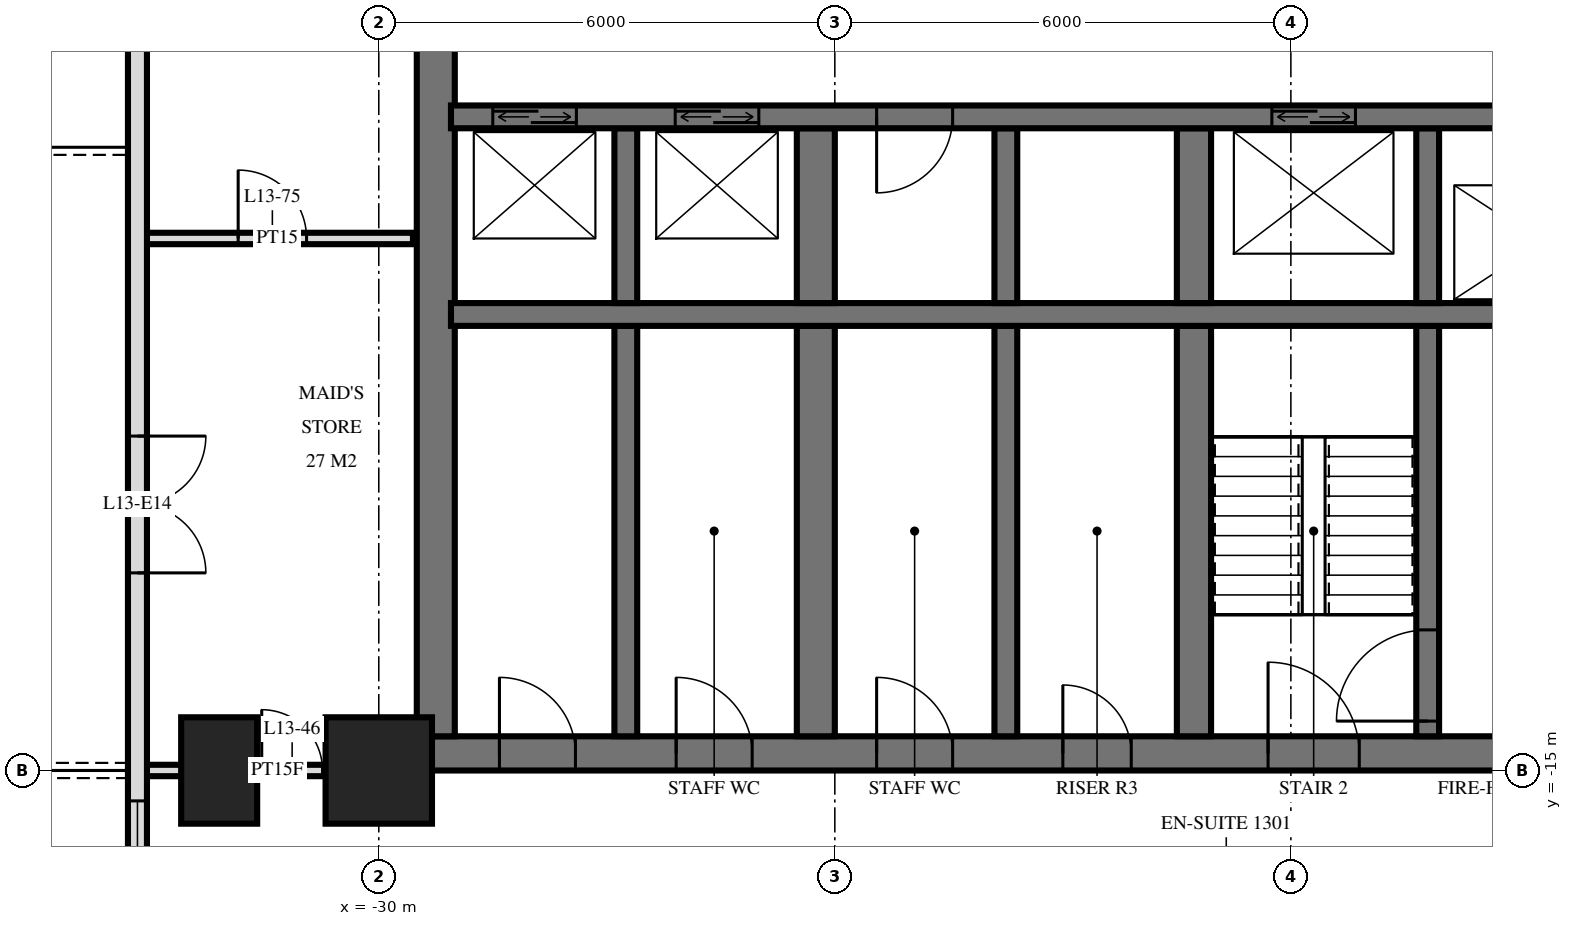
"""IFC4 building model, lengths in metres.
Left out: names, types, materials, properties, quantities, classifications, styles, units other than length and angle.
Written with IfcOpenShell. Run it as: python <this file> out.ifc"""

import sys

from ifc_helpers import new_model, si_unit, direction, frame, frame_2d, origin, origin_2d, place, context, subcontext, project, spatial, rectangle, extrude, element, fill, save


model = new_model("IFC4")
c1 = context("Model", 3, precision=1e-05, world=origin(), true_north=direction((0.0, 1.0)))
c2 = subcontext(c1, "Body", "Model", "MODEL_VIEW")
j1 = project(units=[si_unit("LENGTHUNIT", "METRE"), si_unit("PLANEANGLEUNIT", "RADIAN")], contexts=[c1])
p1 = place(None, origin())
s1 = spatial("IfcSite", under=j1, at=p1, CompositionType="ELEMENT")
p2 = place(p1, origin())
s2 = spatial("IfcBuilding", under=s1, at=p2, CompositionType="ELEMENT")
p3 = place(p2, frame((0.0, 0.0, 56.4)))
s3 = spatial("IfcBuildingStorey", under=s2, at=p3, CompositionType="ELEMENT", Elevation=56.4)
p4 = place(p3, frame((-32.1, -15.0, 0.0), z_axis=(0.0, 0.0, 1.0), x_axis=(0.0, 1.0, 0.0)))
e1 = element("IfcColumn", 1, at=p4, inside=s3, PredefinedType="COLUMN", context=c2, shape_type="SweptSolid", body=[
    extrude(rectangle(XDim=1.4, YDim=1.0, at=origin_2d()), origin(), (0.0, 0.0, 1.0), 3.6),
])
p5 = place(p3, frame((-30.0, -15.0, 0.0), z_axis=(0.0, 0.0, 1.0), x_axis=(1.0, 0.0, 0.0)))
e2 = element("IfcColumn", 2, at=p5, inside=s3, PredefinedType="COLUMN", context=c2, shape_type="SweptSolid", body=[
    extrude(rectangle(XDim=1.4, YDim=1.4, at=origin_2d()), origin(), (0.0, 0.0, 1.0), 3.6),
])
p6 = place(p3, frame((-29.5, -14.775, 0.0), z_axis=(0.0, 0.0, 1.0), x_axis=(1.0, 0.0, 0.0)))
e3 = element("IfcWall", 3, at=p6, inside=s3, PredefinedType="SHEAR", context=c2, shape_type="SweptSolid", body=[
    extrude(rectangle(XDim=19.5, YDim=0.45, at=frame_2d((9.75, 0.0))), origin(), (0.0, 0.0, 1.0), 3.6),
])
p7 = place(p6, frame((11.2, 0.0, 0.0)))
e4 = element("IfcOpeningElement", 4, at=p7, cuts=e3, PredefinedType="OPENING", context=c2, shape_type="SweptSolid", body=[
    extrude(rectangle(XDim=1.2, YDim=2.1, at=frame_2d((0.6, 1.05))), frame((0.0, 0.235, 0.0), z_axis=(0.0, -1.0, 0.0), x_axis=(1.0, 0.0, 0.0)), (0.0, 0.0, 1.0), 0.47),
])
p8 = place(p6, frame((14.25, 0.0, 0.0)))
e5 = element("IfcOpeningElement", 5, at=p8, cuts=e3, PredefinedType="OPENING", context=c2, shape_type="SweptSolid", body=[
    extrude(rectangle(XDim=1.1, YDim=2.1, at=frame_2d((0.55, 1.05))), frame((0.0, 0.235, 0.0), z_axis=(0.0, -1.0, 0.0), x_axis=(1.0, 0.0, 0.0)), (0.0, 0.0, 1.0), 0.47),
])
p9 = place(p6, frame((8.5, 0.0, 0.0)))
e6 = element("IfcOpeningElement", 6, at=p9, cuts=e3, PredefinedType="OPENING", context=c2, shape_type="SweptSolid", body=[
    extrude(rectangle(XDim=0.9, YDim=2.1, at=frame_2d((0.45, 1.05))), frame((0.0, 0.235, 0.0), z_axis=(0.0, -1.0, 0.0), x_axis=(1.0, 0.0, 0.0)), (0.0, 0.0, 1.0), 0.47),
])
p10 = place(p6, frame((6.05, 0.0, 0.0)))
e7 = element("IfcOpeningElement", 7, at=p10, cuts=e3, PredefinedType="OPENING", context=c2, shape_type="SweptSolid", body=[
    extrude(rectangle(XDim=1.0, YDim=2.1, at=frame_2d((0.5, 1.05))), frame((0.0, 0.235, 0.0), z_axis=(0.0, -1.0, 0.0), x_axis=(1.0, 0.0, 0.0)), (0.0, 0.0, 1.0), 0.47),
])
p11 = place(p6, frame((3.413, 0.0, 0.0)))
e8 = element("IfcOpeningElement", 8, at=p11, cuts=e3, PredefinedType="OPENING", context=c2, shape_type="SweptSolid", body=[
    extrude(rectangle(XDim=1.0, YDim=2.1, at=frame_2d((0.5, 1.05))), frame((0.0, 0.235, 0.0), z_axis=(0.0, -1.0, 0.0), x_axis=(1.0, 0.0, 0.0)), (0.0, 0.0, 1.0), 0.47),
])
p12 = place(p6, frame((1.087, 0.0, 0.0)))
e9 = element("IfcOpeningElement", 9, at=p12, cuts=e3, PredefinedType="OPENING", context=c2, shape_type="SweptSolid", body=[
    extrude(rectangle(XDim=1.0, YDim=2.1, at=frame_2d((0.5, 1.05))), frame((0.0, 0.235, 0.0), z_axis=(0.0, -1.0, 0.0), x_axis=(1.0, 0.0, 0.0)), (0.0, 0.0, 1.0), 0.47),
])
p13 = place(p3, frame((-29.25, -14.55, 0.0), z_axis=(0.0, 0.0, 1.0), x_axis=(0.0, 1.0, 0.0)))
e10 = element("IfcWall", 10, at=p13, inside=s3, PredefinedType="SHEAR", context=c2, shape_type="SweptSolid", body=[
    extrude(rectangle(XDim=14.1, YDim=0.5, at=frame_2d((7.05, 0.0))), origin(), (0.0, 0.0, 1.0), 3.6),
])
p14 = place(p3, frame((-29.05, -6.4, 0.0), z_axis=(0.0, 0.0, 1.0), x_axis=(1.0, 0.0, 0.0)))
e11 = element("IfcWall", 11, at=p14, inside=s3, PredefinedType="SHEAR", context=c2, shape_type="SweptSolid", body=[
    extrude(rectangle(XDim=18.7, YDim=0.3, at=frame_2d((9.35, 0.0))), origin(), (0.0, 0.0, 1.0), 3.6),
])
p15 = place(p14, frame((2.95, 0.0, 0.0)))
e12 = element("IfcOpeningElement", 12, at=p15, cuts=e11, PredefinedType="OPENING", context=c2, shape_type="SweptSolid", body=[
    extrude(rectangle(XDim=1.1, YDim=2.1, at=frame_2d((0.55, 1.05))), frame((0.0, 0.16, 0.0), z_axis=(0.0, -1.0, 0.0), x_axis=(1.0, 0.0, 0.0)), (0.0, 0.0, 1.0), 0.32),
])
p16 = place(p14, frame((0.55, 0.0, 0.0)))
e13 = element("IfcOpeningElement", 13, at=p16, cuts=e11, PredefinedType="OPENING", context=c2, shape_type="SweptSolid", body=[
    extrude(rectangle(XDim=1.1, YDim=2.1, at=frame_2d((0.55, 1.05))), frame((0.0, 0.16, 0.0), z_axis=(0.0, -1.0, 0.0), x_axis=(1.0, 0.0, 0.0)), (0.0, 0.0, 1.0), 0.32),
])
p17 = place(p14, frame((10.8, 0.0, 0.0)))
e14 = element("IfcOpeningElement", 14, at=p17, cuts=e11, PredefinedType="OPENING", context=c2, shape_type="SweptSolid", body=[
    extrude(rectangle(XDim=1.1, YDim=2.1, at=frame_2d((0.55, 1.05))), frame((0.0, 0.16, 0.0), z_axis=(0.0, -1.0, 0.0), x_axis=(1.0, 0.0, 0.0)), (0.0, 0.0, 1.0), 0.32),
])
p18 = place(p14, frame((5.6, 0.0, 0.0)))
e15 = element("IfcOpeningElement", 15, at=p18, cuts=e11, PredefinedType="OPENING", context=c2, shape_type="SweptSolid", body=[
    extrude(rectangle(XDim=1.0, YDim=2.1, at=frame_2d((0.5, 1.05))), frame((0.0, 0.16, 0.0), z_axis=(0.0, -1.0, 0.0), x_axis=(1.0, 0.0, 0.0)), (0.0, 0.0, 1.0), 0.32),
])
p19 = place(p3, frame((-29.05, -9.0, 0.0), z_axis=(0.0, 0.0, 1.0), x_axis=(1.0, 0.0, 0.0)))
e16 = element("IfcWall", 16, at=p19, inside=s3, PredefinedType="SHEAR", context=c2, shape_type="SweptSolid", body=[
    extrude(rectangle(XDim=18.7, YDim=0.3, at=frame_2d((9.35, 0.0))), origin(), (0.0, 0.0, 1.0), 3.6),
])
p20 = place(p19, frame((13.8, 0.0, 0.0)))
e17 = element("IfcOpeningElement", 17, at=p20, cuts=e16, PredefinedType="OPENING", context=c2, shape_type="SweptSolid", body=[
    extrude(rectangle(XDim=1.1, YDim=2.1, at=frame_2d((0.55, 1.05))), frame((0.0, 0.16, 0.0), z_axis=(0.0, -1.0, 0.0), x_axis=(1.0, 0.0, 0.0)), (0.0, 0.0, 1.0), 0.32),
])
p21 = place(p3, frame((-16.2, -8.85, 0.0), z_axis=(0.0, 0.0, 1.0), x_axis=(0.0, 1.0, 0.0)))
e18 = element("IfcWall", 18, at=p21, inside=s3, PredefinedType="SHEAR", context=c2, shape_type="SweptSolid", body=[
    extrude(rectangle(XDim=2.3, YDim=0.3, at=frame_2d((1.15, 0.0))), origin(), (0.0, 0.0, 1.0), 3.6),
])
p22 = place(p3, frame((-16.2, -14.55, 0.0), z_axis=(0.0, 0.0, 1.0), x_axis=(0.0, 1.0, 0.0)))
e19 = element("IfcWall", 19, at=p22, inside=s3, PredefinedType="SHEAR", context=c2, shape_type="SweptSolid", body=[
    extrude(rectangle(XDim=5.4, YDim=0.3, at=frame_2d((2.7, 0.0))), origin(), (0.0, 0.0, 1.0), 3.6),
])
p23 = place(p22, frame((0.2, 0.0, 0.0)))
e20 = element("IfcOpeningElement", 20, at=p23, cuts=e19, PredefinedType="OPENING", context=c2, shape_type="SweptSolid", body=[
    extrude(rectangle(XDim=1.2, YDim=2.1, at=frame_2d((0.6, 1.05))), frame((0.0, 0.16, 0.0), z_axis=(0.0, -1.0, 0.0), x_axis=(1.0, 0.0, 0.0)), (0.0, 0.0, 1.0), 0.32),
])
p24 = place(p3, frame((-19.275, -8.85, 0.0), z_axis=(0.0, 0.0, 1.0), x_axis=(0.0, 1.0, 0.0)))
e21 = element("IfcWall", 21, at=p24, inside=s3, PredefinedType="SHEAR", context=c2, shape_type="SweptSolid", body=[
    extrude(rectangle(XDim=2.3, YDim=0.45, at=frame_2d((1.15, 0.0))), origin(), (0.0, 0.0, 1.0), 3.6),
])
p25 = place(p3, frame((-19.275, -14.55, 0.0), z_axis=(0.0, 0.0, 1.0), x_axis=(0.0, 1.0, 0.0)))
e22 = element("IfcWall", 22, at=p25, inside=s3, PredefinedType="SHEAR", context=c2, shape_type="SweptSolid", body=[
    extrude(rectangle(XDim=5.4, YDim=0.45, at=frame_2d((2.7, 0.0))), origin(), (0.0, 0.0, 1.0), 3.6),
])
p26 = place(p3, frame((-21.75, -8.85, 0.0), z_axis=(0.0, 0.0, 1.0), x_axis=(0.0, 1.0, 0.0)))
e23 = element("IfcWall", 23, at=p26, inside=s3, PredefinedType="SHEAR", context=c2, shape_type="SweptSolid", body=[
    extrude(rectangle(XDim=2.3, YDim=0.3, at=frame_2d((1.15, 0.0))), origin(), (0.0, 0.0, 1.0), 3.6),
])
p27 = place(p3, frame((-21.75, -14.55, 0.0), z_axis=(0.0, 0.0, 1.0), x_axis=(0.0, 1.0, 0.0)))
e24 = element("IfcWall", 24, at=p27, inside=s3, PredefinedType="SHEAR", context=c2, shape_type="SweptSolid", body=[
    extrude(rectangle(XDim=5.4, YDim=0.3, at=frame_2d((2.7, 0.0))), origin(), (0.0, 0.0, 1.0), 3.6),
])
p28 = place(p3, frame((-24.25, -8.85, 0.0), z_axis=(0.0, 0.0, 1.0), x_axis=(0.0, 1.0, 0.0)))
e25 = element("IfcWall", 25, at=p28, inside=s3, PredefinedType="SHEAR", context=c2, shape_type="SweptSolid", body=[
    extrude(rectangle(XDim=2.3, YDim=0.5, at=frame_2d((1.15, 0.0))), origin(), (0.0, 0.0, 1.0), 3.6),
])
p29 = place(p3, frame((-24.25, -14.55, 0.0), z_axis=(0.0, 0.0, 1.0), x_axis=(0.0, 1.0, 0.0)))
e26 = element("IfcWall", 26, at=p29, inside=s3, PredefinedType="SHEAR", context=c2, shape_type="SweptSolid", body=[
    extrude(rectangle(XDim=5.4, YDim=0.5, at=frame_2d((2.7, 0.0))), origin(), (0.0, 0.0, 1.0), 3.6),
])
p30 = place(p3, frame((-26.75, -8.85, 0.0), z_axis=(0.0, 0.0, 1.0), x_axis=(0.0, 1.0, 0.0)))
e27 = element("IfcWall", 27, at=p30, inside=s3, PredefinedType="SHEAR", context=c2, shape_type="SweptSolid", body=[
    extrude(rectangle(XDim=2.3, YDim=0.3, at=frame_2d((1.15, 0.0))), origin(), (0.0, 0.0, 1.0), 3.6),
])
p31 = place(p3, frame((-26.75, -14.55, 0.0), z_axis=(0.0, 0.0, 1.0), x_axis=(0.0, 1.0, 0.0)))
e28 = element("IfcWall", 28, at=p31, inside=s3, PredefinedType="SHEAR", context=c2, shape_type="SweptSolid", body=[
    extrude(rectangle(XDim=5.4, YDim=0.3, at=frame_2d((2.7, 0.0))), origin(), (0.0, 0.0, 1.0), 3.6),
])
p32 = place(p3, frame((-33.175, -3.325, 0.0), z_axis=(0.0, 0.0, 1.0), x_axis=(0.0, -1.0, 0.0)))
e29 = element("IfcWall", 29, at=p32, inside=s3, PredefinedType="SOLIDWALL", context=c2, shape_type="SweptSolid", body=[
    extrude(rectangle(XDim=21.551, YDim=0.25, at=frame_2d((10.775, 0.0))), origin(), (0.0, 0.0, 1.0), 3.32),
])
p33 = place(p32, frame((7.275, 0.0, 0.0)))
e30 = element("IfcOpeningElement", 30, at=p33, cuts=e29, PredefinedType="OPENING", context=c2, shape_type="SweptSolid", body=[
    extrude(rectangle(XDim=1.8, YDim=2.4, at=frame_2d((0.9, 1.2))), frame((0.0, 0.135, 0.0), z_axis=(0.0, -1.0, 0.0), x_axis=(1.0, 0.0, 0.0)), (0.0, 0.0, 1.0), 0.27),
])
p34 = place(p32, frame((12.075, 0.0, 0.3)))
e31 = element("IfcOpeningElement", 31, at=p34, cuts=e29, PredefinedType="OPENING", context=c2, shape_type="SweptSolid", body=[
    extrude(rectangle(XDim=1.2, YDim=2.1, at=frame_2d((0.6, 1.05))), frame((0.0, 0.135, 0.0), z_axis=(0.0, -1.0, 0.0), x_axis=(1.0, 0.0, 0.0)), (0.0, 0.0, 1.0), 0.27),
])
p35 = place(p32, frame((14.875, 0.0, 0.0)))
e32 = element("IfcOpeningElement", 32, at=p35, cuts=e29, PredefinedType="OPENING", context=c2, shape_type="SweptSolid", body=[
    extrude(rectangle(XDim=1.8, YDim=2.4, at=frame_2d((0.9, 1.2))), frame((0.0, 0.135, 0.0), z_axis=(0.0, -1.0, 0.0), x_axis=(1.0, 0.0, 0.0)), (0.0, 0.0, 1.0), 0.27),
])
p36 = place(p32, frame((18.875, 0.0, 0.0)))
e33 = element("IfcOpeningElement", 33, at=p36, cuts=e29, PredefinedType="OPENING", context=c2, shape_type="SweptSolid", body=[
    extrude(rectangle(XDim=1.8, YDim=2.4, at=frame_2d((0.9, 1.2))), frame((0.0, 0.135, 0.0), z_axis=(0.0, -1.0, 0.0), x_axis=(1.0, 0.0, 0.0)), (0.0, 0.0, 1.0), 0.27),
])
p37 = place(p3, frame((-33.12, -15.0, 0.0), z_axis=(0.0, 0.0, 1.0), x_axis=(1.0, 0.0, 0.0)))
e34 = element("IfcWall", 34, at=p37, inside=s3, PredefinedType="PARTITIONING", context=c2, shape_type="SweptSolid", body=[
    extrude(rectangle(XDim=3.57, YDim=0.15, at=frame_2d((1.785, 0.0))), origin(), (0.0, 0.0, 1.0), 3.32),
])
p38 = place(p37, frame((1.58, 0.0, 0.0)))
e35 = element("IfcOpeningElement", 35, at=p38, cuts=e34, PredefinedType="OPENING", context=c2, shape_type="SweptSolid", body=[
    extrude(rectangle(XDim=0.8, YDim=2.1, at=frame_2d((0.4, 1.05))), frame((0.0, 0.085, 0.0), z_axis=(0.0, -1.0, 0.0), x_axis=(1.0, 0.0, 0.0)), (0.0, 0.0, 1.0), 0.17),
])
p39 = place(p3, frame((-33.12, -8.0, 0.0), z_axis=(0.0, 0.0, 1.0), x_axis=(1.0, 0.0, 0.0)))
e36 = element("IfcWall", 36, at=p39, inside=s3, PredefinedType="PARTITIONING", context=c2, shape_type="SweptSolid", body=[
    extrude(rectangle(XDim=3.57, YDim=0.15, at=frame_2d((1.785, 0.0))), origin(), (0.0, 0.0, 1.0), 3.32),
])
p40 = place(p39, frame((1.27, 0.0, 0.0)))
e37 = element("IfcOpeningElement", 37, at=p40, cuts=e36, PredefinedType="OPENING", context=c2, shape_type="SweptSolid", body=[
    extrude(rectangle(XDim=0.9, YDim=2.1, at=frame_2d((0.45, 1.05))), frame((0.0, 0.085, 0.0), z_axis=(0.0, -1.0, 0.0), x_axis=(1.0, 0.0, 0.0)), (0.0, 0.0, 1.0), 0.17),
])
p41 = place(p33, origin())
e38 = element("IfcDoor", 38, at=p41, inside=s3, OperationType="DOUBLE_DOOR_SINGLE_SWING", PredefinedType="DOOR", context=c2, shape_type="SweptSolid", body=[
    extrude(rectangle(XDim=1.8, YDim=2.4, at=frame_2d((0.9, 1.2))), frame((0.0, 0.025, 0.0), z_axis=(0.0, -1.0, 0.0), x_axis=(1.0, 0.0, 0.0)), (0.0, 0.0, 1.0), 0.05),
])
fill(e30, e38)
p42 = place(p34, origin())
e39 = element("IfcWindow", 39, at=p42, inside=s3, PartitioningType="SINGLE_PANEL", PredefinedType="WINDOW", context=c2, shape_type="SweptSolid", body=[
    extrude(rectangle(XDim=1.2, YDim=2.1, at=frame_2d((0.6, 1.05))), frame((0.0, 0.03, 0.0), z_axis=(0.0, -1.0, 0.0), x_axis=(1.0, 0.0, 0.0)), (0.0, 0.0, 1.0), 0.06),
])
fill(e31, e39)
p43 = place(p15, origin())
e40 = element("IfcDoor", 40, at=p43, inside=s3, OperationType="DOUBLE_DOOR_SLIDING", PredefinedType="USERDEFINED", context=c2, shape_type="SweptSolid", body=[
    extrude(rectangle(XDim=1.1, YDim=2.1, at=frame_2d((0.55, 1.05))), frame((0.0, 0.025, 0.0), z_axis=(0.0, -1.0, 0.0), x_axis=(1.0, 0.0, 0.0)), (0.0, 0.0, 1.0), 0.05),
])
fill(e12, e40)
p44 = place(p16, origin())
e41 = element("IfcDoor", 41, at=p44, inside=s3, OperationType="DOUBLE_DOOR_SLIDING", PredefinedType="USERDEFINED", context=c2, shape_type="SweptSolid", body=[
    extrude(rectangle(XDim=1.1, YDim=2.1, at=frame_2d((0.55, 1.05))), frame((0.0, 0.025, 0.0), z_axis=(0.0, -1.0, 0.0), x_axis=(1.0, 0.0, 0.0)), (0.0, 0.0, 1.0), 0.05),
])
fill(e13, e41)
p45 = place(p17, origin())
e42 = element("IfcDoor", 42, at=p45, inside=s3, OperationType="DOUBLE_DOOR_SLIDING", PredefinedType="USERDEFINED", context=c2, shape_type="SweptSolid", body=[
    extrude(rectangle(XDim=1.1, YDim=2.1, at=frame_2d((0.55, 1.05))), frame((0.0, 0.025, 0.0), z_axis=(0.0, -1.0, 0.0), x_axis=(1.0, 0.0, 0.0)), (0.0, 0.0, 1.0), 0.05),
])
fill(e14, e42)
p46 = place(p7, origin())
e43 = element("IfcDoor", 43, at=p46, inside=s3, OperationType="SINGLE_SWING_RIGHT", PredefinedType="DOOR", context=c2, shape_type="SweptSolid", body=[
    extrude(rectangle(XDim=1.2, YDim=2.1, at=frame_2d((0.6, 1.05))), frame((0.0, 0.025, 0.0), z_axis=(0.0, -1.0, 0.0), x_axis=(1.0, 0.0, 0.0)), (0.0, 0.0, 1.0), 0.05),
])
fill(e4, e43)
p47 = place(p9, origin())
e44 = element("IfcDoor", 44, at=p47, inside=s3, OperationType="SINGLE_SWING_RIGHT", PredefinedType="DOOR", context=c2, shape_type="SweptSolid", body=[
    extrude(rectangle(XDim=0.9, YDim=2.1, at=frame_2d((0.45, 1.05))), frame((0.0, 0.025, 0.0), z_axis=(0.0, -1.0, 0.0), x_axis=(1.0, 0.0, 0.0)), (0.0, 0.0, 1.0), 0.05),
])
fill(e6, e44)
p48 = place(p10, origin())
e45 = element("IfcDoor", 45, at=p48, inside=s3, OperationType="SINGLE_SWING_RIGHT", PredefinedType="DOOR", context=c2, shape_type="SweptSolid", body=[
    extrude(rectangle(XDim=1.0, YDim=2.1, at=frame_2d((0.5, 1.05))), frame((0.0, 0.025, 0.0), z_axis=(0.0, -1.0, 0.0), x_axis=(1.0, 0.0, 0.0)), (0.0, 0.0, 1.0), 0.05),
])
fill(e7, e45)
p49 = place(p11, origin())
e46 = element("IfcDoor", 46, at=p49, inside=s3, OperationType="SINGLE_SWING_RIGHT", PredefinedType="DOOR", context=c2, shape_type="SweptSolid", body=[
    extrude(rectangle(XDim=1.0, YDim=2.1, at=frame_2d((0.5, 1.05))), frame((0.0, 0.025, 0.0), z_axis=(0.0, -1.0, 0.0), x_axis=(1.0, 0.0, 0.0)), (0.0, 0.0, 1.0), 0.05),
])
fill(e8, e46)
p50 = place(p12, origin())
e47 = element("IfcDoor", 47, at=p50, inside=s3, OperationType="SINGLE_SWING_RIGHT", PredefinedType="DOOR", context=c2, shape_type="SweptSolid", body=[
    extrude(rectangle(XDim=1.0, YDim=2.1, at=frame_2d((0.5, 1.05))), frame((0.0, 0.025, 0.0), z_axis=(0.0, -1.0, 0.0), x_axis=(1.0, 0.0, 0.0)), (0.0, 0.0, 1.0), 0.05),
])
fill(e9, e47)
p51 = place(p18, frame((0.5, 0.0, 0.0), z_axis=(0.0, 0.0, 1.0), x_axis=(-1.0, 0.0, 0.0)))
e48 = element("IfcDoor", 48, at=p51, inside=s3, OperationType="SINGLE_SWING_LEFT", PredefinedType="DOOR", context=c2, shape_type="SweptSolid", body=[
    extrude(rectangle(XDim=1.0, YDim=2.1, at=frame_2d((0.0, 1.05))), frame((0.0, -0.025, 0.0), z_axis=(0.0, 1.0, 0.0), x_axis=(-1.0, 0.0, 0.0)), (0.0, 0.0, 1.0), 0.05),
])
fill(e15, e48)
p52 = place(p23, origin())
e49 = element("IfcDoor", 49, at=p52, inside=s3, OperationType="SINGLE_SWING_RIGHT", PredefinedType="DOOR", context=c2, shape_type="SweptSolid", body=[
    extrude(rectangle(XDim=1.2, YDim=2.1, at=frame_2d((0.6, 1.05))), frame((0.0, 0.025, 0.0), z_axis=(0.0, -1.0, 0.0), x_axis=(1.0, 0.0, 0.0)), (0.0, 0.0, 1.0), 0.05),
])
fill(e20, e49)
p53 = place(p38, origin())
e50 = element("IfcDoor", 50, at=p53, inside=s3, OperationType="SINGLE_SWING_RIGHT", PredefinedType="DOOR", context=c2, shape_type="SweptSolid", body=[
    extrude(rectangle(XDim=0.8, YDim=2.1, at=frame_2d((0.4, 1.05))), frame((0.0, 0.025, 0.0), z_axis=(0.0, -1.0, 0.0), x_axis=(1.0, 0.0, 0.0)), (0.0, 0.0, 1.0), 0.05),
])
fill(e35, e50)
p54 = place(p40, origin())
e51 = element("IfcDoor", 51, at=p54, inside=s3, OperationType="SINGLE_SWING_RIGHT", PredefinedType="DOOR", context=c2, shape_type="SweptSolid", body=[
    extrude(rectangle(XDim=0.9, YDim=2.1, at=frame_2d((0.45, 1.05))), frame((0.0, 0.025, 0.0), z_axis=(0.0, -1.0, 0.0), x_axis=(1.0, 0.0, 0.0)), (0.0, 0.0, 1.0), 0.05),
])
fill(e37, e51)
save(model, sys.argv[1])
